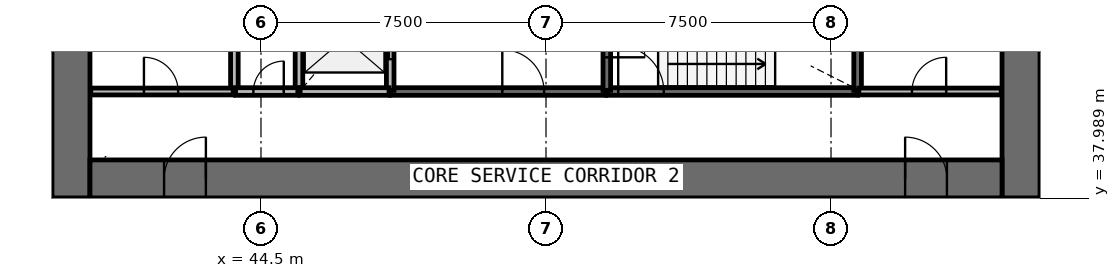
"""IFC4 building model, lengths in metres.
Left out: names, types, materials, properties, quantities, classifications, styles, units other than length and angle.
Written with IfcOpenShell. Run it as: python <this file> out.ifc"""

import sys

from ifc_helpers import new_model, si_unit, direction, frame, frame_2d, origin, place, context, subcontext, project, spatial, rectangle, extrude, source, transform, mapped, element, fill, save


model = new_model("IFC4")
c1 = context("Model", 3, precision=1e-05, world=origin(), true_north=direction((0.0, 1.0)))
c2 = subcontext(c1, "Body", "Model", "MODEL_VIEW")
j1 = project(units=[si_unit("LENGTHUNIT", "METRE"), si_unit("PLANEANGLEUNIT", "RADIAN")], contexts=[c1])
p1 = place(None, origin())
s1 = spatial("IfcSite", under=j1, at=p1, CompositionType="ELEMENT")
p2 = place(p1, origin())
s2 = spatial("IfcBuilding", under=s1, at=p2, CompositionType="ELEMENT")
p3 = place(p2, frame((0.0, 0.0, 27.0)))
s3 = spatial("IfcBuildingStorey", under=s2, at=p3, CompositionType="ELEMENT", Elevation=27.0)
p4 = place(p3, frame((64.5, 38.0, 0.0), z_axis=(0.0, 0.0, 1.0), x_axis=(0.0, 1.0, 0.0)))
e1 = element("IfcWall", 1, at=p4, inside=s3, PredefinedType="SHEAR", context=c2, shape_type="SweptSolid", body=[
    extrude(rectangle(XDim=20.0, YDim=1.0, at=frame_2d((10.0, 0.0))), origin(), (0.0, 0.0, 1.0), 4.4),
])
p5 = place(p4, frame((9.1, 0.0, 0.0)))
e2 = element("IfcOpeningElement", 2, at=p5, cuts=e1, PredefinedType="OPENING", context=c2, shape_type="SweptSolid", body=[
    extrude(rectangle(XDim=1.8, YDim=2.1, at=frame_2d((0.9, 1.05))), frame((0.0, 0.51, 0.0), z_axis=(0.0, -1.0, 0.0), x_axis=(1.0, 0.0, 0.0)), (0.0, 0.0, 1.0), 1.02),
])
p6 = place(p3, frame((39.5, 58.0, 0.0), z_axis=(0.0, 0.0, 1.0), x_axis=(0.0, -1.0, 0.0)))
e3 = element("IfcWall", 3, at=p6, inside=s3, PredefinedType="SHEAR", context=c2, shape_type="SweptSolid", body=[
    extrude(rectangle(XDim=20.0, YDim=1.0, at=frame_2d((10.0, 0.0))), origin(), (0.0, 0.0, 1.0), 4.4),
])
p7 = place(p6, frame((9.1, 0.0, 0.0)))
e4 = element("IfcOpeningElement", 4, at=p7, cuts=e3, PredefinedType="OPENING", context=c2, shape_type="SweptSolid", body=[
    extrude(rectangle(XDim=1.8, YDim=2.1, at=frame_2d((0.9, 1.05))), frame((0.0, 0.51, 0.0), z_axis=(0.0, -1.0, 0.0), x_axis=(1.0, 0.0, 0.0)), (0.0, 0.0, 1.0), 1.02),
])
p8 = place(p3, frame((40.0, 38.5, 0.0), z_axis=(0.0, 0.0, 1.0), x_axis=(1.0, 0.0, 0.0)))
e5 = element("IfcWall", 5, at=p8, inside=s3, PredefinedType="SHEAR", context=c2, shape_type="SweptSolid", body=[
    extrude(rectangle(XDim=24.0, YDim=1.0, at=frame_2d((12.0, 0.0))), origin(), (0.0, 0.0, 1.0), 4.4),
])
p9 = place(p8, frame((21.45, 0.0, 0.0)))
e6 = element("IfcOpeningElement", 6, at=p9, cuts=e5, PredefinedType="OPENING", context=c2, shape_type="SweptSolid", body=[
    extrude(rectangle(XDim=1.1, YDim=2.1, at=frame_2d((0.55, 1.05))), frame((0.0, 0.51, 0.0), z_axis=(0.0, -1.0, 0.0), x_axis=(1.0, 0.0, 0.0)), (0.0, 0.0, 1.0), 1.02),
])
p10 = place(p8, frame((1.95, 0.0, 0.0)))
e7 = element("IfcOpeningElement", 7, at=p10, cuts=e5, PredefinedType="OPENING", context=c2, shape_type="SweptSolid", body=[
    extrude(rectangle(XDim=1.1, YDim=2.1, at=frame_2d((0.55, 1.05))), frame((0.0, 0.51, 0.0), z_axis=(0.0, -1.0, 0.0), x_axis=(1.0, 0.0, 0.0)), (0.0, 0.0, 1.0), 1.02),
])
p11 = place(p3, frame((53.6, 40.8, 0.0), z_axis=(0.0, 0.0, 1.0), x_axis=(1.0, 0.0, 0.0)))
e8 = element("IfcWall", 8, at=p11, inside=s3, PredefinedType="SOLIDWALL", context=c2, shape_type="SweptSolid", body=[
    extrude(rectangle(XDim=6.6, YDim=0.2, at=frame_2d((3.3, 0.0))), origin(), (0.0, 0.0, 1.0), 3.95),
])
p12 = place(p11, frame((0.3, 0.0, 0.0)))
e9 = element("IfcOpeningElement", 9, at=p12, cuts=e8, PredefinedType="OPENING", context=c2, shape_type="SweptSolid", body=[
    extrude(rectangle(XDim=1.2, YDim=2.1, at=frame_2d((0.6, 1.05))), frame((0.0, 0.11, 0.0), z_axis=(0.0, -1.0, 0.0), x_axis=(1.0, 0.0, 0.0)), (0.0, 0.0, 1.0), 0.22),
])
p13 = place(p3, frame((47.9, 40.8, 0.0), z_axis=(0.0, 0.0, 1.0), x_axis=(1.0, 0.0, 0.0)))
e10 = element("IfcWall", 10, at=p13, inside=s3, PredefinedType="SOLIDWALL", context=c2, shape_type="SweptSolid", body=[
    extrude(rectangle(XDim=5.67, YDim=0.2, at=frame_2d((2.835, 0.0))), origin(), (0.0, 0.0, 1.0), 3.95),
])
p14 = place(p13, frame((2.95, 0.0, 0.0)))
e11 = element("IfcOpeningElement", 11, at=p14, cuts=e10, PredefinedType="OPENING", context=c2, shape_type="SweptSolid", body=[
    extrude(rectangle(XDim=1.1, YDim=2.1, at=frame_2d((0.55, 1.05))), frame((0.0, 0.11, 0.0), z_axis=(0.0, -1.0, 0.0), x_axis=(1.0, 0.0, 0.0)), (0.0, 0.0, 1.0), 0.22),
])
for number, where, z_axis, x_axis in (
    (12, (43.8, 43.6, 0.0), (0.0, 0.0, 1.0), (0.0, -1.0, 0.0)),
    (13, (45.5, 43.6, 0.0), (0.0, 0.0, 1.0), (0.0, -1.0, 0.0)),
):
    element("IfcWall", number, at=place(p3, frame(where, z_axis=z_axis, x_axis=x_axis)), inside=s3, PredefinedType="SOLIDWALL", context=c2, shape_type="SweptSolid", body=[
        extrude(rectangle(XDim=2.8, YDim=0.2, at=frame_2d((1.4, 0.0))), origin(), (0.0, 0.0, 1.0), 3.95),
    ])
p15 = place(p3, frame((47.9, 40.83, 0.0), z_axis=(0.0, 0.0, 1.0), x_axis=(0.0, 1.0, 0.0)))
e14 = element("IfcWall", 14, at=p15, inside=s3, PredefinedType="SOLIDWALL", context=c2, shape_type="SweptSolid", body=[
    extrude(rectangle(XDim=2.77, YDim=0.2, at=frame_2d((1.385, 0.0))), origin(), (0.0, 0.0, 1.0), 3.95),
])
p16 = place(p15, frame((0.82, 0.0, 0.0)))
e15 = element("IfcOpeningElement", 15, at=p16, cuts=e14, PredefinedType="OPENING", context=c2, shape_type="SweptSolid", body=[
    extrude(rectangle(XDim=1.1, YDim=2.1, at=frame_2d((0.55, 1.05))), frame((0.0, 0.11, 0.0), z_axis=(0.0, -1.0, 0.0), x_axis=(1.0, 0.0, 0.0)), (0.0, 0.0, 1.0), 0.22),
])
p17 = place(p3, frame((60.2, 40.83, 0.0), z_axis=(0.0, 0.0, 1.0), x_axis=(0.0, 1.0, 0.0)))
e16 = element("IfcWall", 16, at=p17, inside=s3, PredefinedType="SOLIDWALL", context=c2, shape_type="SweptSolid", body=[
    extrude(rectangle(XDim=2.77, YDim=0.2, at=frame_2d((1.385, 0.0))), origin(), (0.0, 0.0, 1.0), 3.95),
])
p18 = place(p3, frame((53.6, 43.6, 0.0), z_axis=(0.0, 0.0, 1.0), x_axis=(0.0, -1.0, 0.0)))
e17 = element("IfcWall", 17, at=p18, inside=s3, PredefinedType="SOLIDWALL", context=c2, shape_type="SweptSolid", body=[
    extrude(rectangle(XDim=2.77, YDim=0.2, at=frame_2d((1.385, 0.0))), origin(), (0.0, 0.0, 1.0), 3.95),
])
p19 = place(p18, frame((0.9, 0.0, 0.0)))
e18 = element("IfcOpeningElement", 18, at=p19, cuts=e17, PredefinedType="OPENING", context=c2, shape_type="SweptSolid", body=[
    extrude(rectangle(XDim=1.0, YDim=2.1, at=frame_2d((0.5, 1.05))), frame((0.0, 0.11, 0.0), z_axis=(0.0, -1.0, 0.0), x_axis=(1.0, 0.0, 0.0)), (0.0, 0.0, 1.0), 0.22),
])
p20 = place(p3, frame((45.53, 40.8, 0.0), z_axis=(0.0, 0.0, 1.0), x_axis=(1.0, 0.0, 0.0)))
e19 = element("IfcWall", 19, at=p20, inside=s3, PredefinedType="SOLIDWALL", context=c2, shape_type="SweptSolid", body=[
    extrude(rectangle(XDim=2.34, YDim=0.2, at=frame_2d((1.17, 0.0))), origin(), (0.0, 0.0, 1.0), 3.95),
])
p21 = place(p3, frame((43.83, 40.8, 0.0), z_axis=(0.0, 0.0, 1.0), x_axis=(1.0, 0.0, 0.0)))
e20 = element("IfcWall", 20, at=p21, inside=s3, PredefinedType="SOLIDWALL", context=c2, shape_type="SweptSolid", body=[
    extrude(rectangle(XDim=1.64, YDim=0.2, at=frame_2d((0.82, 0.0))), origin(), (0.0, 0.0, 1.0), 3.95),
])
p22 = place(p21, frame((0.47, 0.0, 0.0)))
e21 = element("IfcOpeningElement", 21, at=p22, cuts=e20, PredefinedType="OPENING", context=c2, shape_type="SweptSolid", body=[
    extrude(rectangle(XDim=0.8, YDim=2.1, at=frame_2d((0.4, 1.05))), frame((0.0, 0.11, 0.0), z_axis=(0.0, -1.0, 0.0), x_axis=(1.0, 0.0, 0.0)), (0.0, 0.0, 1.0), 0.22),
])
p23 = place(p3, frame((40.02, 40.8, 0.0), z_axis=(0.0, 0.0, 1.0), x_axis=(1.0, 0.0, 0.0)))
e22 = element("IfcWall", 22, at=p23, inside=s3, PredefinedType="PARTITIONING", context=c2, shape_type="SweptSolid", body=[
    extrude(rectangle(XDim=3.75, YDim=0.18, at=frame_2d((1.875, 0.0))), origin(), (0.0, 0.0, 1.0), 3.95),
])
p24 = place(p23, frame((1.4, 0.0, 0.0)))
e23 = element("IfcOpeningElement", 23, at=p24, cuts=e22, PredefinedType="OPENING", context=c2, shape_type="SweptSolid", body=[
    extrude(rectangle(XDim=0.9, YDim=2.1, at=frame_2d((0.45, 1.05))), frame((0.0, 0.1, 0.0), z_axis=(0.0, -1.0, 0.0), x_axis=(1.0, 0.0, 0.0)), (0.0, 0.0, 1.0), 0.2),
])
p25 = place(p3, frame((60.23, 40.8, 0.0), z_axis=(0.0, 0.0, 1.0), x_axis=(1.0, 0.0, 0.0)))
e24 = element("IfcWall", 24, at=p25, inside=s3, PredefinedType="PARTITIONING", context=c2, shape_type="SweptSolid", body=[
    extrude(rectangle(XDim=3.75, YDim=0.18, at=frame_2d((1.875, 0.0))), origin(), (0.0, 0.0, 1.0), 3.95),
])
p26 = place(p25, frame((1.4, 0.0, 0.0)))
e25 = element("IfcOpeningElement", 25, at=p26, cuts=e24, PredefinedType="OPENING", context=c2, shape_type="SweptSolid", body=[
    extrude(rectangle(XDim=0.9, YDim=2.1, at=frame_2d((0.45, 1.05))), frame((0.0, 0.1, 0.0), z_axis=(0.0, -1.0, 0.0), x_axis=(1.0, 0.0, 0.0)), (0.0, 0.0, 1.0), 0.2),
])
m1 = source(origin(), c2, "Body", "SweptSolid", [
    extrude(rectangle(XDim=1.1, YDim=2.1, at=frame_2d((0.55, 1.05))), frame((0.0, 0.025, 0.0), z_axis=(0.0, -1.0, 0.0), x_axis=(1.0, 0.0, 0.0)), (0.0, 0.0, 1.0), 0.05),
])
p27 = place(p16, origin())
e26 = element("IfcDoor", 26, at=p27, inside=s3, OperationType="DOUBLE_DOOR_SLIDING", PredefinedType="USERDEFINED", context=c2, shape_type="MappedRepresentation", body=[
    mapped(m1, transform((0.0, 0.0, 0.0), scale=1.0)),
])
fill(e15, e26)
m2 = source(origin(), c2, "Body", "SweptSolid", [
    extrude(rectangle(XDim=1.2, YDim=2.1, at=frame_2d((0.6, 1.05))), frame((0.0, 0.025, 0.0), z_axis=(0.0, -1.0, 0.0), x_axis=(1.0, 0.0, 0.0)), (0.0, 0.0, 1.0), 0.05),
])
p28 = place(p12, origin())
e27 = element("IfcDoor", 27, at=p28, inside=s3, OperationType="SINGLE_SWING_LEFT", PredefinedType="DOOR", context=c2, shape_type="MappedRepresentation", body=[
    mapped(m2, transform((0.0, 0.0, 0.0), scale=1.0)),
])
fill(e9, e27)
m3 = source(origin(), c2, "Body", "SweptSolid", [
    extrude(rectangle(XDim=1.0, YDim=2.1, at=frame_2d((0.5, 1.05))), frame((0.0, 0.025, 0.0), z_axis=(0.0, -1.0, 0.0), x_axis=(1.0, 0.0, 0.0)), (0.0, 0.0, 1.0), 0.05),
])
p29 = place(p19, origin())
e28 = element("IfcDoor", 28, at=p29, inside=s3, OperationType="SINGLE_SWING_RIGHT", PredefinedType="DOOR", context=c2, shape_type="MappedRepresentation", body=[
    mapped(m3, transform((0.0, 0.0, 0.0), scale=1.0)),
])
fill(e18, e28)
m4 = source(origin(), c2, "Body", "SweptSolid", [
    extrude(rectangle(XDim=1.1, YDim=2.1, at=frame_2d((0.55, 1.05))), frame((0.0, 0.025, 0.0), z_axis=(0.0, -1.0, 0.0), x_axis=(1.0, 0.0, 0.0)), (0.0, 0.0, 1.0), 0.05),
])
p30 = place(p14, origin())
e29 = element("IfcDoor", 29, at=p30, inside=s3, OperationType="SINGLE_SWING_LEFT", PredefinedType="DOOR", context=c2, shape_type="MappedRepresentation", body=[
    mapped(m4, transform((0.0, 0.0, 0.0), scale=1.0)),
])
fill(e11, e29)
m5 = source(origin(), c2, "Body", "SweptSolid", [
    extrude(rectangle(XDim=0.8, YDim=2.1, at=frame_2d((0.4, 1.05))), frame((0.0, 0.025, 0.0), z_axis=(0.0, -1.0, 0.0), x_axis=(1.0, 0.0, 0.0)), (0.0, 0.0, 1.0), 0.05),
])
p31 = place(p22, origin())
e30 = element("IfcDoor", 30, at=p31, inside=s3, OperationType="SINGLE_SWING_RIGHT", PredefinedType="DOOR", context=c2, shape_type="MappedRepresentation", body=[
    mapped(m5, transform((0.0, 0.0, 0.0), scale=1.0)),
])
fill(e21, e30)
m6 = source(origin(), c2, "Body", "SweptSolid", [
    extrude(rectangle(XDim=1.1, YDim=2.1, at=frame_2d((0.55, 1.05))), frame((0.0, 0.025, 0.0), z_axis=(0.0, -1.0, 0.0), x_axis=(1.0, 0.0, 0.0)), (0.0, 0.0, 1.0), 0.05),
])
p32 = place(p9, origin())
e31 = element("IfcDoor", 31, at=p32, inside=s3, OperationType="SINGLE_SWING_LEFT", PredefinedType="DOOR", context=c2, shape_type="MappedRepresentation", body=[
    mapped(m6, transform((0.0, 0.0, 0.0), scale=1.0)),
])
fill(e6, e31)
p33 = place(p10, origin())
e32 = element("IfcDoor", 32, at=p33, inside=s3, OperationType="SINGLE_SWING_RIGHT", PredefinedType="DOOR", context=c2, shape_type="MappedRepresentation", body=[
    mapped(m6, transform((0.0, 0.0, 0.0), scale=1.0)),
])
fill(e7, e32)
m7 = source(origin(), c2, "Body", "SweptSolid", [
    extrude(rectangle(XDim=0.9, YDim=2.1, at=frame_2d((0.45, 1.05))), frame((0.0, 0.025, 0.0), z_axis=(0.0, -1.0, 0.0), x_axis=(1.0, 0.0, 0.0)), (0.0, 0.0, 1.0), 0.05),
])
p34 = place(p24, origin())
e33 = element("IfcDoor", 33, at=p34, inside=s3, OperationType="SINGLE_SWING_LEFT", PredefinedType="DOOR", context=c2, shape_type="MappedRepresentation", body=[
    mapped(m7, transform((0.0, 0.0, 0.0), scale=1.0)),
])
fill(e23, e33)
p35 = place(p26, origin())
e34 = element("IfcDoor", 34, at=p35, inside=s3, OperationType="SINGLE_SWING_RIGHT", PredefinedType="DOOR", context=c2, shape_type="MappedRepresentation", body=[
    mapped(m7, transform((0.0, 0.0, 0.0), scale=1.0)),
])
fill(e25, e34)
save(model, sys.argv[1])
